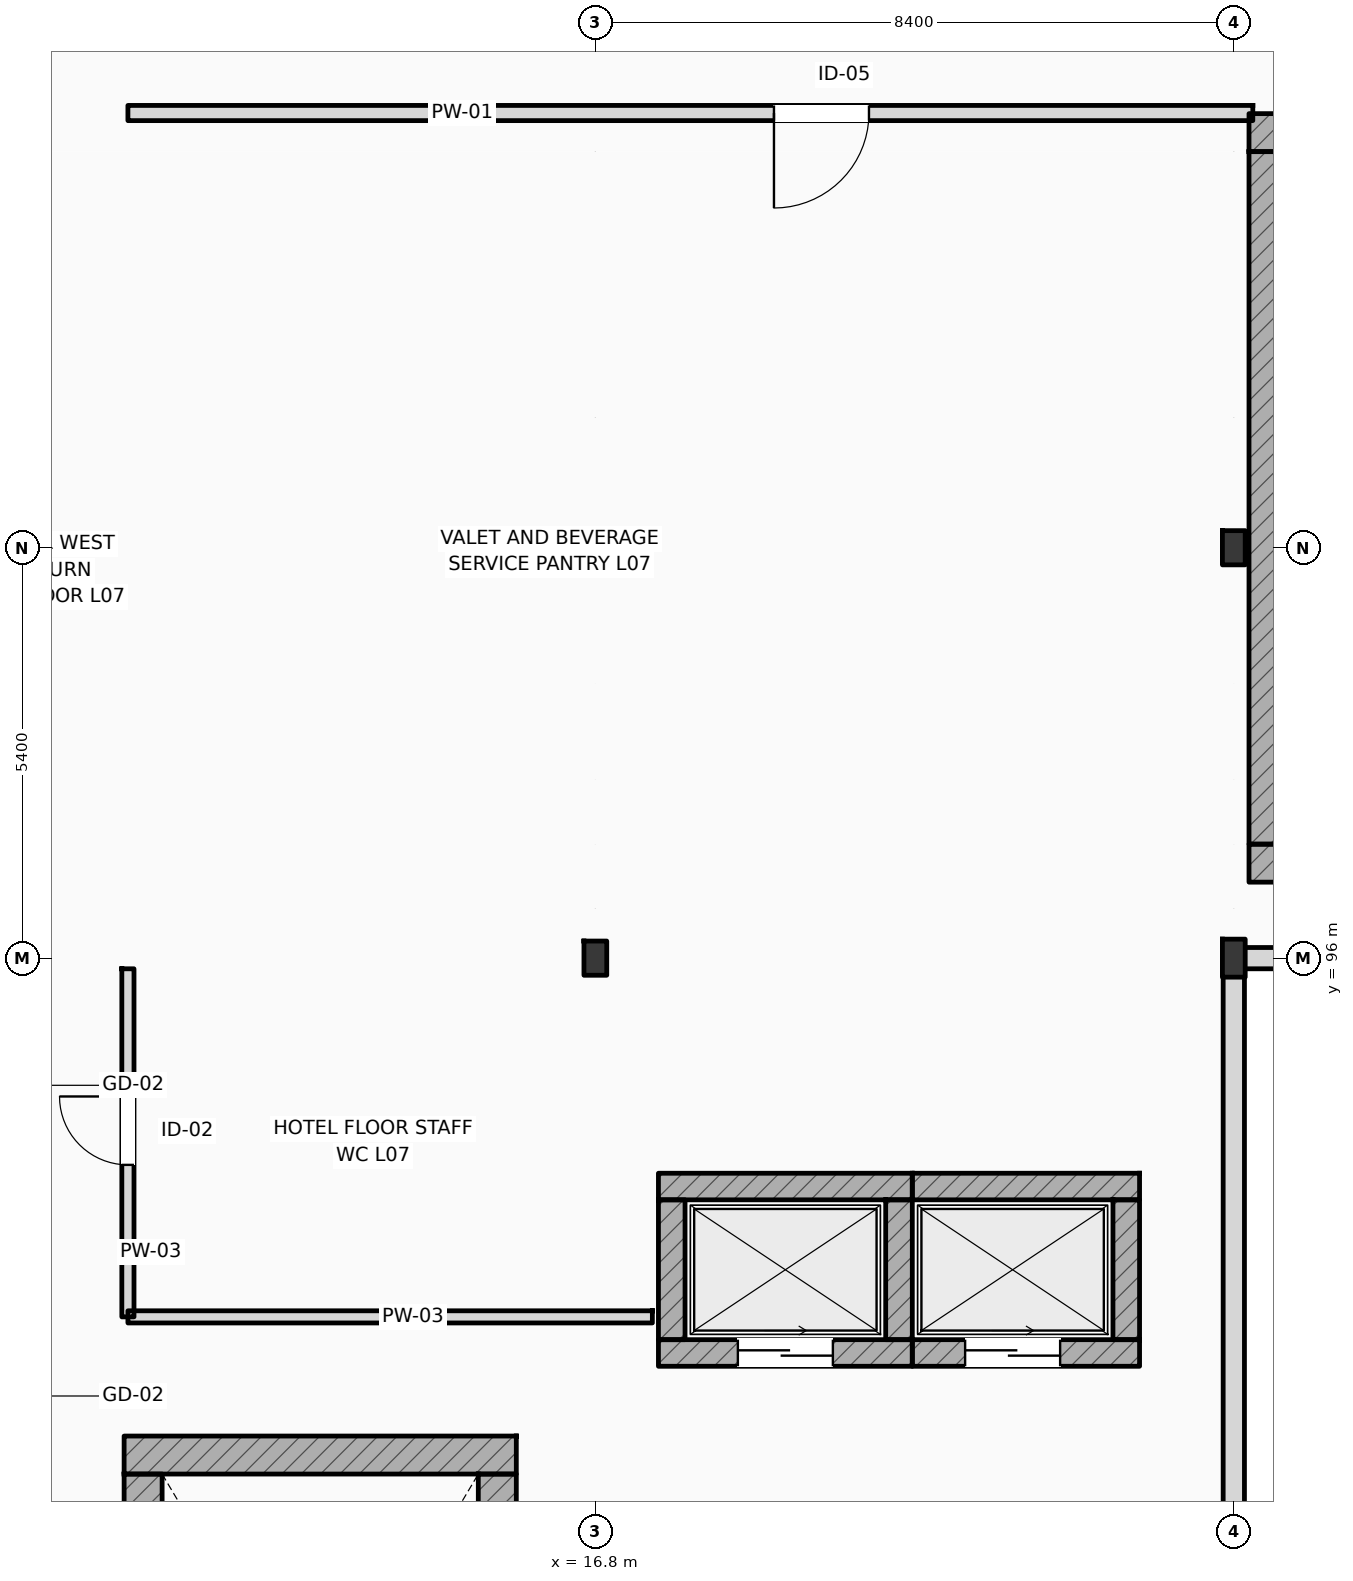
"""IFC4 building model, lengths in metres.
Left out: names, types, materials, properties, quantities, classifications, styles, units other than length and angle.
Written with IfcOpenShell. Run it as: python <this file> out.ifc"""

import sys

from ifc_helpers import new_model, si_unit, direction, frame, frame_2d, origin, origin_2d, place, context, subcontext, project, spatial, rectangle, i_section, extrude, element, fill, save


model = new_model("IFC4")
c1 = context("Model", 3, precision=1e-05, world=origin(), true_north=direction((0.0, 1.0)))
c2 = subcontext(c1, "Body", "Model", "MODEL_VIEW")
j1 = project(units=[si_unit("LENGTHUNIT", "METRE"), si_unit("PLANEANGLEUNIT", "RADIAN")], contexts=[c1])
p1 = place(None, origin())
s1 = spatial("IfcSite", under=j1, at=p1, CompositionType="ELEMENT")
p2 = place(p1, origin())
s2 = spatial("IfcBuilding", under=s1, at=p2, CompositionType="ELEMENT")
p3 = place(p2, frame((0.0, 0.0, 31.8)))
s3 = spatial("IfcBuildingStorey", under=s2, at=p3, CompositionType="ELEMENT", Elevation=31.8)
p4 = place(p3, frame((16.8, 96.0, 0.0), z_axis=(0.0, 0.0, 1.0), x_axis=(1.0, 0.0, 0.0)))
e1 = element("IfcColumn", 1, at=p4, inside=s3, PredefinedType="COLUMN", context=c2, shape_type="SweptSolid", body=[
    extrude(i_section(OverallWidth=0.3, OverallDepth=0.45, WebThickness=0.014, FlangeThickness=0.026, FilletRadius=0.027, at=origin_2d()), origin(), (0.0, 0.0, 1.0), 3.6),
])
p5 = place(p3, frame((25.2, 96.0, 0.0), z_axis=(0.0, 0.0, 1.0), x_axis=(1.0, 0.0, 0.0)))
e2 = element("IfcColumn", 2, at=p5, inside=s3, PredefinedType="COLUMN", context=c2, shape_type="SweptSolid", body=[
    extrude(i_section(OverallWidth=0.3, OverallDepth=0.5, WebThickness=0.014, FlangeThickness=0.028, FilletRadius=0.027, at=origin_2d()), origin(), (0.0, 0.0, 1.0), 3.6),
])
for number, where, z_axis, x_axis in (
    (3, (16.8, 101.4, 0.0), (0.0, 0.0, 1.0), (1.0, 0.0, 0.0)),
    (4, (25.2, 101.4, 0.0), (0.0, 0.0, 1.0), (1.0, 0.0, 0.0)),
):
    element("IfcColumn", number, at=place(p3, frame(where, z_axis=z_axis, x_axis=x_axis)), inside=s3, PredefinedType="COLUMN", context=c2, shape_type="SweptSolid", body=[
        extrude(i_section(OverallWidth=0.3, OverallDepth=0.45, WebThickness=0.014, FlangeThickness=0.026, FilletRadius=0.027, at=origin_2d()), origin(), (0.0, 0.0, 1.0), 3.6),
    ])
p6 = place(p3, frame((10.6, 89.462, 0.0), z_axis=(0.0, 0.0, 1.0), x_axis=(1.0, 0.0, 0.0)))
e5 = element("IfcWall", 5, at=p6, inside=s3, PredefinedType="SHEAR", context=c2, shape_type="SweptSolid", body=[
    extrude(rectangle(XDim=5.16, YDim=0.5, at=frame_2d((2.58, 0.0))), origin(), (0.0, 0.0, 1.0), 3.6),
])
p7 = place(p3, frame((10.85, 80.1, 0.0), z_axis=(0.0, 0.0, 1.0), x_axis=(0.0, 1.0, 0.0)))
e6 = element("IfcWall", 6, at=p7, inside=s3, PredefinedType="SHEAR", context=c2, shape_type="SweptSolid", body=[
    extrude(rectangle(XDim=9.112, YDim=0.5, at=frame_2d((4.556, 0.0))), origin(), (0.0, 0.0, 1.0), 3.6),
])
p8 = place(p3, frame((15.51, 80.1, 0.0), z_axis=(0.0, 0.0, 1.0), x_axis=(0.0, 1.0, 0.0)))
e7 = element("IfcWall", 7, at=p8, inside=s3, PredefinedType="SHEAR", context=c2, shape_type="SweptSolid", body=[
    extrude(rectangle(XDim=9.112, YDim=0.5, at=frame_2d((4.556, 0.0))), origin(), (0.0, 0.0, 1.0), 3.6),
])
p9 = place(p8, frame((0.44, 0.0, 0.0)))
e8 = element("IfcOpeningElement", 8, at=p9, cuts=e7, PredefinedType="OPENING", context=c2, shape_type="SweptSolid", body=[
    extrude(rectangle(XDim=1.1, YDim=2.2, at=frame_2d((0.55, 1.1))), frame((0.0, 0.26, 0.0), z_axis=(0.0, -1.0, 0.0), x_axis=(1.0, 0.0, 0.0)), (0.0, 0.0, 1.0), 0.52),
])
for number, where, z_axis, x_axis in (
    (9, (25.4, 106.862, 0.0), (0.0, 0.0, 1.0), (1.0, 0.0, 0.0)),
    (10, (25.4, 97.25, 0.0), (0.0, 0.0, 1.0), (1.0, 0.0, 0.0)),
):
    element("IfcWall", number, at=place(p3, frame(where, z_axis=z_axis, x_axis=x_axis)), inside=s3, PredefinedType="SHEAR", context=c2, shape_type="SweptSolid", body=[
        extrude(rectangle(XDim=5.16, YDim=0.5, at=frame_2d((2.58, 0.0))), origin(), (0.0, 0.0, 1.0), 3.6),
    ])
p10 = place(p3, frame((25.65, 97.5, 0.0), z_axis=(0.0, 0.0, 1.0), x_axis=(0.0, 1.0, 0.0)))
e11 = element("IfcWall", 11, at=p10, inside=s3, PredefinedType="SHEAR", context=c2, shape_type="SweptSolid", body=[
    extrude(rectangle(XDim=9.112, YDim=0.5, at=frame_2d((4.556, 0.0))), origin(), (0.0, 0.0, 1.0), 3.6),
])
p11 = place(p3, frame((25.2, 96.0, 0.0), z_axis=(0.0, 0.0, 1.0), x_axis=(1.0, 0.0, 0.0)))
e12 = element("IfcWall", 12, at=p11, inside=s3, PredefinedType="STANDARD", context=c2, shape_type="SweptSolid", body=[
    extrude(rectangle(XDim=94.8, YDim=0.28, at=frame_2d((47.4, 0.0))), origin(), (0.0, 0.0, 1.0), 2.72),
])
p12 = place(p11, frame((16.394, 0.0, 0.9)))
e13 = element("IfcOpeningElement", 13, at=p12, cuts=e12, PredefinedType="OPENING", context=c2, shape_type="SweptSolid", body=[
    extrude(rectangle(XDim=2.0, YDim=1.64, at=frame_2d((1.0, 0.82))), frame((0.0, 0.15, 0.0), z_axis=(0.0, -1.0, 0.0), x_axis=(1.0, 0.0, 0.0)), (0.0, 0.0, 1.0), 0.3),
])
p13 = place(p11, frame((20.207, 0.0, 0.9)))
e14 = element("IfcOpeningElement", 14, at=p13, cuts=e12, PredefinedType="OPENING", context=c2, shape_type="SweptSolid", body=[
    extrude(rectangle(XDim=2.3, YDim=1.64, at=frame_2d((1.15, 0.82))), frame((0.0, 0.15, 0.0), z_axis=(0.0, -1.0, 0.0), x_axis=(1.0, 0.0, 0.0)), (0.0, 0.0, 1.0), 0.3),
])
p14 = place(p11, frame((24.287, 0.0, 0.9)))
e15 = element("IfcOpeningElement", 15, at=p14, cuts=e12, PredefinedType="OPENING", context=c2, shape_type="SweptSolid", body=[
    extrude(rectangle(XDim=2.358, YDim=1.64, at=frame_2d((1.179, 0.82))), frame((0.0, 0.15, 0.0), z_axis=(0.0, -1.0, 0.0), x_axis=(1.0, 0.0, 0.0)), (0.0, 0.0, 1.0), 0.3),
])
p15 = place(p11, frame((27.665, 0.0, 0.9)))
e16 = element("IfcOpeningElement", 16, at=p15, cuts=e12, PredefinedType="OPENING", context=c2, shape_type="SweptSolid", body=[
    extrude(rectangle(XDim=1.8, YDim=1.64, at=frame_2d((0.9, 0.82))), frame((0.0, 0.15, 0.0), z_axis=(0.0, -1.0, 0.0), x_axis=(1.0, 0.0, 0.0)), (0.0, 0.0, 1.0), 0.3),
])
p16 = place(p11, frame((32.103, 0.0, 0.9)))
e17 = element("IfcOpeningElement", 17, at=p16, cuts=e12, PredefinedType="OPENING", context=c2, shape_type="SweptSolid", body=[
    extrude(rectangle(XDim=2.359, YDim=1.64, at=frame_2d((1.179, 0.82))), frame((0.0, 0.15, 0.0), z_axis=(0.0, -1.0, 0.0), x_axis=(1.0, 0.0, 0.0)), (0.0, 0.0, 1.0), 0.3),
])
p17 = place(p11, frame((36.336, 0.0, 0.9)))
e18 = element("IfcOpeningElement", 18, at=p17, cuts=e12, PredefinedType="OPENING", context=c2, shape_type="SweptSolid", body=[
    extrude(rectangle(XDim=1.2, YDim=1.64, at=frame_2d((0.6, 0.82))), frame((0.0, 0.15, 0.0), z_axis=(0.0, -1.0, 0.0), x_axis=(1.0, 0.0, 0.0)), (0.0, 0.0, 1.0), 0.3),
])
p18 = place(p11, frame((56.177, 0.0, 0.9)))
e19 = element("IfcOpeningElement", 19, at=p18, cuts=e12, PredefinedType="OPENING", context=c2, shape_type="SweptSolid", body=[
    extrude(rectangle(XDim=1.35, YDim=1.64, at=frame_2d((0.675, 0.82))), frame((0.0, 0.15, 0.0), z_axis=(0.0, -1.0, 0.0), x_axis=(1.0, 0.0, 0.0)), (0.0, 0.0, 1.0), 0.3),
])
p19 = place(p11, frame((60.086, 0.0, 0.9)))
e20 = element("IfcOpeningElement", 20, at=p19, cuts=e12, PredefinedType="OPENING", context=c2, shape_type="SweptSolid", body=[
    extrude(rectangle(XDim=1.5, YDim=1.64, at=frame_2d((0.75, 0.82))), frame((0.0, 0.15, 0.0), z_axis=(0.0, -1.0, 0.0), x_axis=(1.0, 0.0, 0.0)), (0.0, 0.0, 1.0), 0.3),
])
p20 = place(p11, frame((64.838, 0.0, 0.9)))
e21 = element("IfcOpeningElement", 21, at=p20, cuts=e12, PredefinedType="OPENING", context=c2, shape_type="SweptSolid", body=[
    extrude(rectangle(XDim=1.65, YDim=1.64, at=frame_2d((0.825, 0.82))), frame((0.0, 0.15, 0.0), z_axis=(0.0, -1.0, 0.0), x_axis=(1.0, 0.0, 0.0)), (0.0, 0.0, 1.0), 0.3),
])
p21 = place(p11, frame((68.419, 0.0, 0.9)))
e22 = element("IfcOpeningElement", 22, at=p21, cuts=e12, PredefinedType="OPENING", context=c2, shape_type="SweptSolid", body=[
    extrude(rectangle(XDim=0.9, YDim=1.64, at=frame_2d((0.45, 0.82))), frame((0.0, 0.15, 0.0), z_axis=(0.0, -1.0, 0.0), x_axis=(1.0, 0.0, 0.0)), (0.0, 0.0, 1.0), 0.3),
])
p22 = place(p11, frame((73.544, 0.0, 0.9)))
e23 = element("IfcOpeningElement", 23, at=p22, cuts=e12, PredefinedType="OPENING", context=c2, shape_type="SweptSolid", body=[
    extrude(rectangle(XDim=1.95, YDim=1.64, at=frame_2d((0.975, 0.82))), frame((0.0, 0.15, 0.0), z_axis=(0.0, -1.0, 0.0), x_axis=(1.0, 0.0, 0.0)), (0.0, 0.0, 1.0), 0.3),
])
p23 = place(p11, frame((78.897, 0.0, 0.9)))
e24 = element("IfcOpeningElement", 24, at=p23, cuts=e12, PredefinedType="OPENING", context=c2, shape_type="SweptSolid", body=[
    extrude(rectangle(XDim=1.35, YDim=1.64, at=frame_2d((0.675, 0.82))), frame((0.0, 0.15, 0.0), z_axis=(0.0, -1.0, 0.0), x_axis=(1.0, 0.0, 0.0)), (0.0, 0.0, 1.0), 0.3),
])
p24 = place(p11, frame((82.249, 0.0, 0.9)))
e25 = element("IfcOpeningElement", 25, at=p24, cuts=e12, PredefinedType="OPENING", context=c2, shape_type="SweptSolid", body=[
    extrude(rectangle(XDim=2.25, YDim=1.64, at=frame_2d((1.125, 0.82))), frame((0.0, 0.15, 0.0), z_axis=(0.0, -1.0, 0.0), x_axis=(1.0, 0.0, 0.0)), (0.0, 0.0, 1.0), 0.3),
])
p25 = place(p11, frame((87.202, 0.0, 0.9)))
e26 = element("IfcOpeningElement", 26, at=p25, cuts=e12, PredefinedType="OPENING", context=c2, shape_type="SweptSolid", body=[
    extrude(rectangle(XDim=1.8, YDim=1.64, at=frame_2d((0.9, 0.82))), frame((0.0, 0.15, 0.0), z_axis=(0.0, -1.0, 0.0), x_axis=(1.0, 0.0, 0.0)), (0.0, 0.0, 1.0), 0.3),
])
p26 = place(p11, frame((90.867, 0.0, 0.9)))
e27 = element("IfcOpeningElement", 27, at=p26, cuts=e12, PredefinedType="OPENING", context=c2, shape_type="SweptSolid", body=[
    extrude(rectangle(XDim=2.55, YDim=1.64, at=frame_2d((1.275, 0.82))), frame((0.0, 0.15, 0.0), z_axis=(0.0, -1.0, 0.0), x_axis=(1.0, 0.0, 0.0)), (0.0, 0.0, 1.0), 0.3),
])
p27 = place(p3, frame((25.2, 79.5, 0.0), z_axis=(0.0, 0.0, 1.0), x_axis=(0.0, 1.0, 0.0)))
e28 = element("IfcWall", 28, at=p27, inside=s3, PredefinedType="STANDARD", context=c2, shape_type="SweptSolid", body=[
    extrude(rectangle(XDim=16.5, YDim=0.28, at=frame_2d((8.25, 0.0))), origin(), (0.0, 0.0, 1.0), 2.99),
])
p28 = place(p3, frame((17.63, 92.995, 0.0), z_axis=(0.0, 0.0, 1.0), x_axis=(1.0, 0.0, 0.0)))
e29 = element("IfcWall", 29, at=p28, inside=s3, PredefinedType="SHEAR", context=c2, shape_type="SweptSolid", body=[
    extrude(rectangle(XDim=3.34, YDim=0.35, at=frame_2d((1.67, 0.0))), origin(), (0.0, 0.0, 1.0), 3.36),
])
p29 = place(p3, frame((17.63, 90.805, 0.0), z_axis=(0.0, 0.0, 1.0), x_axis=(1.0, 0.0, 0.0)))
e30 = element("IfcWall", 30, at=p29, inside=s3, PredefinedType="SHEAR", context=c2, shape_type="SweptSolid", body=[
    extrude(rectangle(XDim=3.34, YDim=0.35, at=frame_2d((1.67, 0.0))), origin(), (0.0, 0.0, 1.0), 3.36),
])
p30 = place(p29, frame((1.045, 0.0, 0.0)))
e31 = element("IfcOpeningElement", 31, at=p30, cuts=e30, PredefinedType="OPENING", context=c2, shape_type="SweptSolid", body=[
    extrude(rectangle(XDim=1.25, YDim=2.25, at=frame_2d((0.625, 1.125))), frame((0.0, 0.185, 0.0), z_axis=(0.0, -1.0, 0.0), x_axis=(1.0, 0.0, 0.0)), (0.0, 0.0, 1.0), 0.37),
])
for number, where, z_axis, x_axis in (
    (32, (17.805, 90.98, 0.0), (0.0, 0.0, 1.0), (0.0, 1.0, 0.0)),
    (33, (20.795, 90.98, 0.0), (0.0, 0.0, 1.0), (0.0, 1.0, 0.0)),
):
    element("IfcWall", number, at=place(p3, frame(where, z_axis=z_axis, x_axis=x_axis)), inside=s3, PredefinedType="SHEAR", context=c2, shape_type="SweptSolid", body=[
        extrude(rectangle(XDim=1.84, YDim=0.35, at=frame_2d((0.92, 0.0))), origin(), (0.0, 0.0, 1.0), 3.36),
    ])
p31 = place(p3, frame((20.97, 92.995, 0.0), z_axis=(0.0, 0.0, 1.0), x_axis=(1.0, 0.0, 0.0)))
e34 = element("IfcWall", 34, at=p31, inside=s3, PredefinedType="SHEAR", context=c2, shape_type="SweptSolid", body=[
    extrude(rectangle(XDim=2.99, YDim=0.35, at=frame_2d((1.495, 0.0))), origin(), (0.0, 0.0, 1.0), 3.36),
])
p32 = place(p3, frame((20.97, 90.805, 0.0), z_axis=(0.0, 0.0, 1.0), x_axis=(1.0, 0.0, 0.0)))
e35 = element("IfcWall", 35, at=p32, inside=s3, PredefinedType="SHEAR", context=c2, shape_type="SweptSolid", body=[
    extrude(rectangle(XDim=2.99, YDim=0.35, at=frame_2d((1.495, 0.0))), origin(), (0.0, 0.0, 1.0), 3.36),
])
p33 = place(p32, frame((0.695, 0.0, 0.0)))
e36 = element("IfcOpeningElement", 36, at=p33, cuts=e35, PredefinedType="OPENING", context=c2, shape_type="SweptSolid", body=[
    extrude(rectangle(XDim=1.25, YDim=2.25, at=frame_2d((0.625, 1.125))), frame((0.0, 0.185, 0.0), z_axis=(0.0, -1.0, 0.0), x_axis=(1.0, 0.0, 0.0)), (0.0, 0.0, 1.0), 0.37),
])
p34 = place(p3, frame((23.785, 90.98, 0.0), z_axis=(0.0, 0.0, 1.0), x_axis=(0.0, 1.0, 0.0)))
e37 = element("IfcWall", 37, at=p34, inside=s3, PredefinedType="SHEAR", context=c2, shape_type="SweptSolid", body=[
    extrude(rectangle(XDim=1.84, YDim=0.35, at=frame_2d((0.92, 0.0))), origin(), (0.0, 0.0, 1.0), 3.36),
])
p35 = place(p3, frame((10.65, 107.12, 0.0), z_axis=(0.0, 0.0, 1.0), x_axis=(1.0, 0.0, 0.0)))
e38 = element("IfcWall", 38, at=p35, inside=s3, PredefinedType="PARTITIONING", context=c2, shape_type="SweptSolid", body=[
    extrude(rectangle(XDim=14.8, YDim=0.2, at=frame_2d((7.4, 0.0))), origin(), (0.0, 0.0, 1.0), 3.36),
])
p36 = place(p35, frame((8.5, 0.0, 0.0)))
e39 = element("IfcOpeningElement", 39, at=p36, cuts=e38, PredefinedType="OPENING", context=c2, shape_type="SweptSolid", body=[
    extrude(rectangle(XDim=1.25, YDim=2.15, at=frame_2d((0.625, 1.075))), frame((0.0, 0.11, 0.0), z_axis=(0.0, -1.0, 0.0), x_axis=(1.0, 0.0, 0.0)), (0.0, 0.0, 1.0), 0.22),
])
p37 = place(p3, frame((10.65, 91.28, 0.0), z_axis=(0.0, 0.0, 1.0), x_axis=(0.0, 1.0, 0.0)))
e40 = element("IfcWall", 40, at=p37, inside=s3, PredefinedType="PARTITIONING", context=c2, shape_type="SweptSolid", body=[
    extrude(rectangle(XDim=4.58, YDim=0.16, at=frame_2d((2.29, 0.0))), origin(), (0.0, 0.0, 1.0), 3.36),
])
p38 = place(p37, frame((2.0, 0.0, 0.0)))
e41 = element("IfcOpeningElement", 41, at=p38, cuts=e40, PredefinedType="OPENING", context=c2, shape_type="SweptSolid", body=[
    extrude(rectangle(XDim=0.9, YDim=2.1, at=frame_2d((0.45, 1.05))), frame((0.0, 0.09, 0.0), z_axis=(0.0, -1.0, 0.0), x_axis=(1.0, 0.0, 0.0)), (0.0, 0.0, 1.0), 0.18),
])
p39 = place(p3, frame((10.65, 91.28, 0.0), z_axis=(0.0, 0.0, 1.0), x_axis=(1.0, 0.0, 0.0)))
e42 = element("IfcWall", 42, at=p39, inside=s3, PredefinedType="PARTITIONING", context=c2, shape_type="SweptSolid", body=[
    extrude(rectangle(XDim=6.9, YDim=0.16, at=frame_2d((3.45, 0.0))), origin(), (0.0, 0.0, 1.0), 3.36),
])
p40 = place(p30, origin())
e43 = element("IfcDoor", 43, at=p40, inside=s3, OperationType="SLIDING_TO_LEFT", PredefinedType="DOOR", context=c2, shape_type="SweptSolid", body=[
    extrude(rectangle(XDim=1.25, YDim=2.25, at=frame_2d((0.625, 1.125))), frame((0.0, 0.025, 0.0), z_axis=(0.0, -1.0, 0.0), x_axis=(1.0, 0.0, 0.0)), (0.0, 0.0, 1.0), 0.05),
])
fill(e31, e43)
p41 = place(p33, origin())
e44 = element("IfcDoor", 44, at=p41, inside=s3, OperationType="SLIDING_TO_LEFT", PredefinedType="DOOR", context=c2, shape_type="SweptSolid", body=[
    extrude(rectangle(XDim=1.25, YDim=2.25, at=frame_2d((0.625, 1.125))), frame((0.0, 0.025, 0.0), z_axis=(0.0, -1.0, 0.0), x_axis=(1.0, 0.0, 0.0)), (0.0, 0.0, 1.0), 0.05),
])
fill(e36, e44)
p42 = place(p38, origin())
e45 = element("IfcDoor", 45, at=p42, inside=s3, OperationType="SINGLE_SWING_RIGHT", PredefinedType="DOOR", context=c2, shape_type="SweptSolid", body=[
    extrude(rectangle(XDim=0.9, YDim=2.1, at=frame_2d((0.45, 1.05))), frame((0.0, 0.025, 0.0), z_axis=(0.0, -1.0, 0.0), x_axis=(1.0, 0.0, 0.0)), (0.0, 0.0, 1.0), 0.05),
])
fill(e41, e45)
p43 = place(p36, frame((1.25, 0.0, 0.0), z_axis=(0.0, 0.0, 1.0), x_axis=(-1.0, 0.0, 0.0)))
e46 = element("IfcDoor", 46, at=p43, inside=s3, OperationType="SINGLE_SWING_LEFT", PredefinedType="DOOR", context=c2, shape_type="SweptSolid", body=[
    extrude(rectangle(XDim=1.25, YDim=2.15, at=frame_2d((0.625, 1.075))), frame((0.0, 0.025, 0.0), z_axis=(0.0, -1.0, 0.0), x_axis=(1.0, 0.0, 0.0)), (0.0, 0.0, 1.0), 0.05),
])
fill(e39, e46)
save(model, sys.argv[1])
